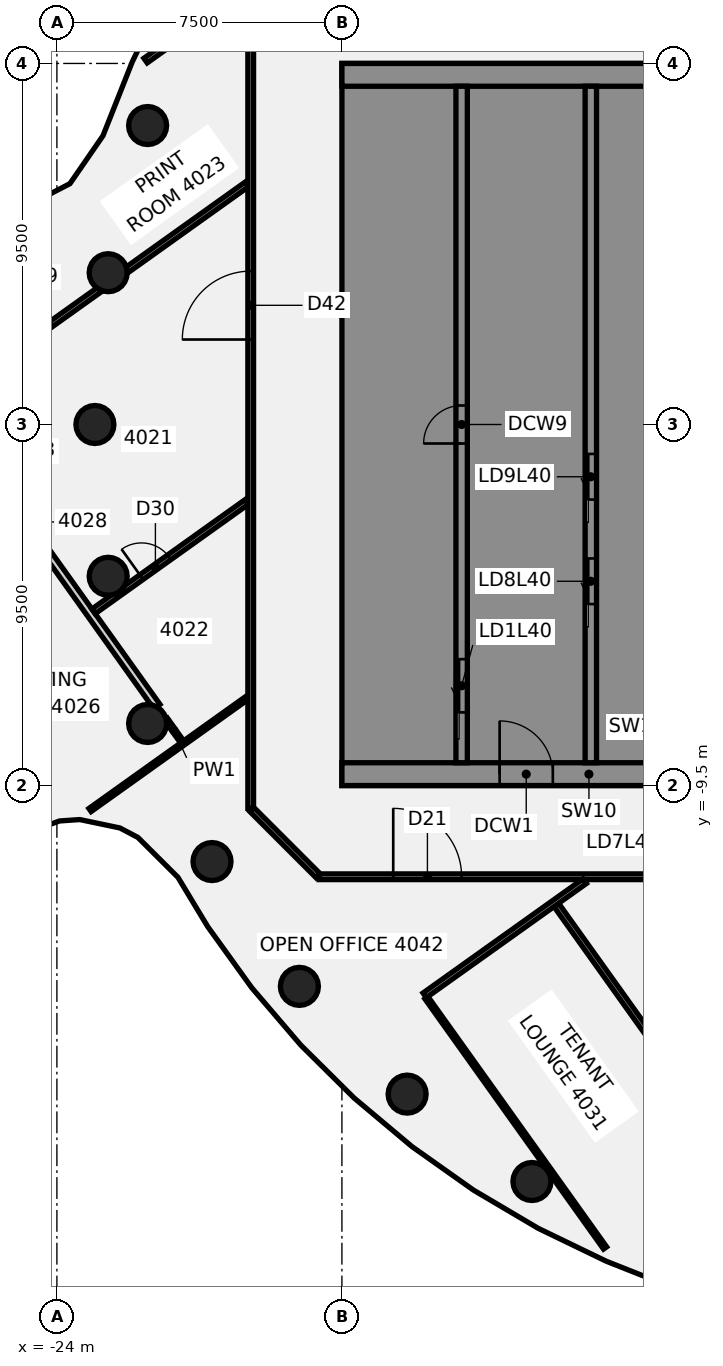
"""IFC4 building model, lengths in metres.
Left out: names, types, materials, properties, quantities, classifications, styles, units other than length and angle.
Written with IfcOpenShell. Run it as: python <this file> out.ifc"""

import sys

from ifc_helpers import new_model, si_unit, direction, frame, frame_2d, origin, origin_2d, place, context, subcontext, project, spatial, polyline, rectangle, circle, outline, extrude, element, fill, save


model = new_model("IFC4")
c1 = context("Model", 3, precision=1e-05, world=origin(), true_north=direction((0.0, 1.0)))
c2 = subcontext(c1, "Body", "Model", "MODEL_VIEW")
j1 = project(units=[si_unit("LENGTHUNIT", "METRE"), si_unit("PLANEANGLEUNIT", "RADIAN")], contexts=[c1])
p1 = place(None, origin())
s1 = spatial("IfcSite", under=j1, at=p1, CompositionType="ELEMENT")
p2 = place(p1, origin())
s2 = spatial("IfcBuilding", under=s1, at=p2, CompositionType="ELEMENT")
p3 = place(p2, frame((0.0, 0.0, 163.0)))
s3 = spatial("IfcBuildingStorey", under=s2, at=p3, CompositionType="ELEMENT", Elevation=163.0)
for number, where, z_axis, x_axis in (
    (1, (-21.613, 7.866, -0.14), (0.0, 0.0, 1.0), (1.0, 0.0, 0.0)),
    (2, (-22.651, 3.994, -0.14), (0.0, 0.0, 1.0), (1.0, 0.0, 0.0)),
    (3, (-23.0, 0.0, -0.14), (0.0, 0.0, 1.0), (1.0, 0.0, 0.0)),
    (4, (-22.651, -3.994, -0.14), (0.0, 0.0, 1.0), (1.0, 0.0, 0.0)),
    (5, (-21.613, -7.866, -0.14), (0.0, 0.0, 1.0), (1.0, 0.0, 0.0)),
    (6, (-19.919, -11.5, -0.14), (0.0, 0.0, 1.0), (1.0, 0.0, 0.0)),
    (7, (-17.619, -14.784, -0.14), (0.0, 0.0, 1.0), (1.0, 0.0, 0.0)),
    (8, (-14.784, -17.619, -0.14), (0.0, 0.0, 1.0), (1.0, 0.0, 0.0)),
    (9, (-11.5, -19.919, -0.14), (0.0, 0.0, 1.0), (1.0, 0.0, 0.0)),
):
    element("IfcColumn", number, at=place(p3, frame(where, z_axis=z_axis, x_axis=x_axis)), inside=s3, PredefinedType="COLUMN", context=c2, shape_type="SweptSolid", body=[
        extrude(circle(Radius=0.5, at=origin_2d()), origin(), (0.0, 0.0, 1.0), 3.75),
    ])
p4 = place(p3, frame((-28.985, 3.244, 0.0), z_axis=(0.0, 0.0, 1.0), x_axis=(0.581102498489, -0.813830379287, 0.0)))
e10 = element("IfcWall", 10, at=p4, inside=s3, PredefinedType="PARTITIONING", context=c2, shape_type="SweptSolid", body=[
    extrude(rectangle(XDim=13.106, YDim=0.2, at=frame_2d((6.553, 0.0))), origin(), (0.0, 0.0, 1.0), 3.01),
])
p5 = place(p4, frame((5.799, 0.0, 0.0)))
e11 = element("IfcOpeningElement", 11, at=p5, cuts=e10, PredefinedType="OPENING", context=c2, shape_type="SweptSolid", body=[
    extrude(rectangle(XDim=1.4, YDim=2.1, at=frame_2d((0.7, 1.05))), frame((0.0, 0.11, 0.0), z_axis=(0.0, -1.0, 0.0), x_axis=(1.0, 0.0, 0.0)), (0.0, 0.0, 1.0), 0.22),
])
p6 = place(p3, frame((-21.134, -7.752, 0.0), z_axis=(0.0, 0.0, 1.0), x_axis=(0.581112755837, -0.813823055094, 0.0)))
e12 = element("IfcWall", 12, at=p6, inside=s3, PredefinedType="PARTITIONING", context=c2, shape_type="SweptSolid", body=[
    extrude(rectangle(XDim=0.737, YDim=0.1, at=frame_2d((0.368, 0.0))), origin(), (0.0, 0.0, 1.0), 3.01),
])
p7 = place(p3, frame((-14.276, -15.083, 0.0), z_axis=(0.0, 0.0, 1.0), x_axis=(0.581066903394, -0.813855794217, 0.0)))
e13 = element("IfcWall", 13, at=p7, inside=s3, PredefinedType="PARTITIONING", context=c2, shape_type="SweptSolid", body=[
    extrude(rectangle(XDim=8.09, YDim=0.1, at=frame_2d((4.045, 0.0))), origin(), (0.0, 0.0, 1.0), 3.01),
])
p8 = place(p3, frame((-10.855, -12.646, 0.0), z_axis=(0.0, 0.0, 1.0), x_axis=(0.581046528205, -0.813870341063, 0.0)))
e14 = element("IfcWall", 14, at=p8, inside=s3, PredefinedType="PARTITIONING", context=c2, shape_type="SweptSolid", body=[
    extrude(rectangle(XDim=11.689, YDim=0.15, at=frame_2d((5.844, 0.0))), origin(), (0.0, 0.0, 1.0), 3.01),
])
p9 = place(p8, frame((6.37, 0.0, 0.0)))
e15 = element("IfcOpeningElement", 15, at=p9, cuts=e14, PredefinedType="OPENING", context=c2, shape_type="SweptSolid", body=[
    extrude(rectangle(XDim=1.8, YDim=2.1, at=frame_2d((0.9, 1.05))), frame((0.0, 0.085, 0.0), z_axis=(0.0, -1.0, 0.0), x_axis=(1.0, 0.0, 0.0)), (0.0, 0.0, 1.0), 0.17),
])
p10 = place(p3, frame((-18.872, -10.128, 0.0), z_axis=(0.0, 0.0, 1.0), x_axis=(0.707106781187, -0.707106781187, 0.0)))
e16 = element("IfcWall", 16, at=p10, inside=s3, PredefinedType="PARTITIONING", context=c2, shape_type="SweptSolid", body=[
    extrude(rectangle(XDim=2.465, YDim=0.15, at=frame_2d((1.232, 0.0))), origin(), (0.0, 0.0, 1.0), 3.01),
])
p11 = place(p3, frame((-17.1, -11.9, 0.0), z_axis=(0.0, 0.0, 1.0), x_axis=(1.0, 0.0, 0.0)))
e17 = element("IfcWall", 17, at=p11, inside=s3, PredefinedType="PARTITIONING", context=c2, shape_type="SweptSolid", body=[
    extrude(rectangle(XDim=34.165, YDim=0.15, at=frame_2d((17.083, 0.0))), origin(), (0.0, 0.0, 1.0), 3.01),
])
p12 = place(p11, frame((9.703, 0.0, 0.0)))
e18 = element("IfcOpeningElement", 18, at=p12, cuts=e17, PredefinedType="OPENING", context=c2, shape_type="SweptSolid", body=[
    extrude(rectangle(XDim=1.8, YDim=2.1, at=frame_2d((0.9, 1.05))), frame((0.0, 0.085, 0.0), z_axis=(0.0, -1.0, 0.0), x_axis=(1.0, 0.0, 0.0)), (0.0, 0.0, 1.0), 0.17),
])
p13 = place(p11, frame((1.95, 0.0, 0.0)))
e19 = element("IfcOpeningElement", 19, at=p13, cuts=e17, PredefinedType="OPENING", context=c2, shape_type="SweptSolid", body=[
    extrude(rectangle(XDim=1.8, YDim=2.1, at=frame_2d((0.9, 1.05))), frame((0.0, 0.085, 0.0), z_axis=(0.0, -1.0, 0.0), x_axis=(1.0, 0.0, 0.0)), (0.0, 0.0, 1.0), 0.17),
])
p14 = place(p11, frame((23.878, 0.0, 0.0)))
e20 = element("IfcOpeningElement", 20, at=p14, cuts=e17, PredefinedType="OPENING", context=c2, shape_type="SweptSolid", body=[
    extrude(rectangle(XDim=1.8, YDim=2.1, at=frame_2d((0.9, 1.05))), frame((0.0, 0.085, 0.0), z_axis=(0.0, -1.0, 0.0), x_axis=(1.0, 0.0, 0.0)), (0.0, 0.0, 1.0), 0.17),
])
p15 = place(p3, frame((-14.322, -15.02, 0.0), z_axis=(0.0, 0.0, 1.0), x_axis=(0.81419877711, 0.580586213541, 0.0)))
e21 = element("IfcWall", 21, at=p15, inside=s3, PredefinedType="PARTITIONING", context=c2, shape_type="SweptSolid", body=[
    extrude(rectangle(XDim=5.173, YDim=0.15, at=frame_2d((2.586, 0.0))), origin(), (0.0, 0.0, 1.0), 3.01),
])
p16 = place(p3, frame((-26.987, 0.617, 0.0), z_axis=(0.0, 0.0, 1.0), x_axis=(0.81386107039, 0.581059513392, 0.0)))
e22 = element("IfcWall", 22, at=p16, inside=s3, PredefinedType="PARTITIONING", context=c2, shape_type="SweptSolid", body=[
    extrude(rectangle(XDim=5.041, YDim=0.15, at=frame_2d((2.521, 0.0))), origin(), (0.0, 0.0, 1.0), 3.01),
])
p17 = place(p16, frame((2.6, 0.0, 0.0)))
e23 = element("IfcOpeningElement", 23, at=p17, cuts=e22, PredefinedType="OPENING", context=c2, shape_type="SweptSolid", body=[
    extrude(rectangle(XDim=0.9, YDim=2.1, at=frame_2d((0.45, 1.05))), frame((0.0, 0.085, 0.0), z_axis=(0.0, -1.0, 0.0), x_axis=(1.0, 0.0, 0.0)), (0.0, 0.0, 1.0), 0.17),
])
p18 = place(p3, frame((-22.159, 4.064, 0.0), z_axis=(0.0, 0.0, 1.0), x_axis=(0.813818497272, 0.581119138816, 0.0)))
e24 = element("IfcWall", 24, at=p18, inside=s3, PredefinedType="PARTITIONING", context=c2, shape_type="SweptSolid", body=[
    extrude(rectangle(XDim=3.88, YDim=0.15, at=frame_2d((1.94, 0.0))), origin(), (0.0, 0.0, 1.0), 3.01),
])
p19 = place(p3, frame((-23.036, -4.917, 0.0), z_axis=(0.0, 0.0, 1.0), x_axis=(0.813829971932, 0.581103068986, 0.0)))
e25 = element("IfcWall", 25, at=p19, inside=s3, PredefinedType="PARTITIONING", context=c2, shape_type="SweptSolid", body=[
    extrude(rectangle(XDim=4.957, YDim=0.15, at=frame_2d((2.479, 0.0))), origin(), (0.0, 0.0, 1.0), 3.01),
])
p20 = place(p19, frame((1.55, 0.0, 0.0)))
e26 = element("IfcOpeningElement", 26, at=p20, cuts=e25, PredefinedType="OPENING", context=c2, shape_type="SweptSolid", body=[
    extrude(rectangle(XDim=0.9, YDim=2.1, at=frame_2d((0.45, 1.05))), frame((0.0, 0.085, 0.0), z_axis=(0.0, -1.0, 0.0), x_axis=(1.0, 0.0, 0.0)), (0.0, 0.0, 1.0), 0.17),
])
p21 = place(p3, frame((-23.129, -10.144, 0.0), z_axis=(0.0, 0.0, 1.0), x_axis=(0.813856589763, 0.581065789132, 0.0)))
e27 = element("IfcWall", 27, at=p21, inside=s3, PredefinedType="PARTITIONING", context=c2, shape_type="SweptSolid", body=[
    extrude(rectangle(XDim=5.091, YDim=0.1, at=frame_2d((2.545, 0.0))), origin(), (0.0, 0.0, 1.0), 3.01),
])
p22 = place(p3, frame((-21.667, 9.575, 0.0), z_axis=(0.0, 0.0, 1.0), x_axis=(0.813848610714, 0.581076964643, 0.0)))
e28 = element("IfcWall", 28, at=p22, inside=s3, PredefinedType="PARTITIONING", context=c2, shape_type="SweptSolid", body=[
    extrude(rectangle(XDim=8.165, YDim=0.15, at=frame_2d((4.083, 0.0))), origin(), (0.0, 0.0, 1.0), 3.01),
])
p23 = place(p3, frame((-18.9, -10.1, 0.0), z_axis=(0.0, 0.0, 1.0), x_axis=(0.0, 1.0, 0.0)))
e29 = element("IfcWall", 29, at=p23, inside=s3, PredefinedType="PARTITIONING", context=c2, shape_type="SweptSolid", body=[
    extrude(rectangle(XDim=20.2, YDim=0.15, at=frame_2d((10.1, 0.0))), origin(), (0.0, 0.0, 1.0), 3.01),
])
p24 = place(p23, frame((12.336, 0.0, 0.0)))
e30 = element("IfcOpeningElement", 30, at=p24, cuts=e29, PredefinedType="OPENING", context=c2, shape_type="SweptSolid", body=[
    extrude(rectangle(XDim=1.8, YDim=2.1, at=frame_2d((0.9, 1.05))), frame((0.0, 0.085, 0.0), z_axis=(0.0, -1.0, 0.0), x_axis=(1.0, 0.0, 0.0)), (0.0, 0.0, 1.0), 0.17),
])
p25 = place(p3, frame((-16.5, -9.2, 0.0), z_axis=(0.0, 0.0, 1.0), x_axis=(1.0, 0.0, 0.0)))
e31 = element("IfcWall", 31, at=p25, inside=s3, PredefinedType="SHEAR", context=c2, shape_type="SweptSolid", body=[
    extrude(rectangle(XDim=13.0, YDim=0.6, at=frame_2d((6.5, 0.0))), origin(), (0.0, 0.0, 1.0), 3.61),
])
p26 = place(p25, frame((4.15, 0.0, 0.0)))
e32 = element("IfcOpeningElement", 32, at=p26, cuts=e31, PredefinedType="OPENING", context=c2, shape_type="SweptSolid", body=[
    extrude(rectangle(XDim=1.4, YDim=2.1, at=frame_2d((0.7, 1.05))), frame((0.0, 0.31, 0.0), z_axis=(0.0, -1.0, 0.0), x_axis=(1.0, 0.0, 0.0)), (0.0, 0.0, 1.0), 0.62),
])
p27 = place(p25, frame((10.125, 0.0, 0.0)))
e33 = element("IfcOpeningElement", 33, at=p27, cuts=e31, PredefinedType="OPENING", context=c2, shape_type="SweptSolid", body=[
    extrude(rectangle(XDim=1.4, YDim=2.1, at=frame_2d((0.7, 1.05))), frame((0.0, 0.31, 0.0), z_axis=(0.0, -1.0, 0.0), x_axis=(1.0, 0.0, 0.0)), (0.0, 0.0, 1.0), 0.62),
])
p28 = place(p3, origin())
e34 = element("IfcWall", 34, at=p28, inside=s3, PredefinedType="SHEAR", context=c2, shape_type="SweptSolid", body=[
    extrude(outline(polyline([(-13.5, -8.125), (-15.9, -8.125), (-15.9, -5.625), (-13.5, -5.625), (-13.5, -5.375), (-15.9, -5.375), (-15.9, 5.375), (-13.5, 5.375), (-13.5, 5.625), (-15.9, 5.625), (-15.9, 8.125), (-13.5, 8.125), (-13.5, 8.9), (-15.9, 8.9), (-16.5, 8.9), (-16.5, -8.9), (-15.9, -8.9), (-13.5, -8.9), (-13.5, -8.125)])), origin(), (0.0, 0.0, 1.0), 3.61),
])
p29 = place(p3, frame((-16.5, 9.2, 0.0), z_axis=(0.0, 0.0, 1.0), x_axis=(1.0, 0.0, 0.0)))
e35 = element("IfcWall", 35, at=p29, inside=s3, PredefinedType="SHEAR", context=c2, shape_type="SweptSolid", body=[
    extrude(rectangle(XDim=13.0, YDim=0.6, at=frame_2d((6.5, 0.0))), origin(), (0.0, 0.0, 1.0), 3.61),
])
p30 = place(p3, origin())
e36 = element("IfcWall", 36, at=p30, inside=s3, PredefinedType="SHEAR", context=c2, shape_type="SweptSolid", body=[
    extrude(outline(polyline([(-9.8, -5.375), (-9.8, -5.625), (-7.5, -5.625), (-7.2, -5.625), (-7.2, 8.9), (-7.5, 8.9), (-9.8, 8.9), (-9.8, 8.125), (-7.5, 8.125), (-7.5, 5.625), (-9.8, 5.625), (-9.8, 5.375), (-7.5, 5.375), (-7.5, 2.875), (-9.8, 2.875), (-9.8, 2.625), (-7.5, 2.625), (-7.5, 0.125), (-9.8, 0.125), (-9.8, -0.125), (-7.5, -0.125), (-7.5, -2.625), (-9.8, -2.625), (-9.8, -2.875), (-7.5, -2.875), (-7.5, -5.375), (-9.8, -5.375)])), origin(), (0.0, 0.0, 1.0), 3.61),
])
p31 = place(p3, origin())
e37 = element("IfcWall", 37, at=p31, inside=s3, PredefinedType="SHEAR", context=c2, shape_type="SweptSolid", body=[
    extrude(outline(polyline([(-7.5, -8.125), (-9.55, -8.125), (-9.55, -5.625), (-9.8, -5.625), (-9.8, -8.125), (-9.8, -8.9), (-7.5, -8.9), (-7.5, -8.125)])), origin(), (0.0, 0.0, 1.0), 3.61),
])
p32 = place(p3, frame((-13.35, -8.9, 0.0), z_axis=(0.0, 0.0, 1.0), x_axis=(0.0, 1.0, 0.0)))
e38 = element("IfcWall", 38, at=p32, inside=s3, PredefinedType="SHEAR", context=c2, shape_type="SweptSolid", body=[
    extrude(rectangle(XDim=17.8, YDim=0.3, at=frame_2d((8.9, 0.0))), origin(), (0.0, 0.0, 1.0), 3.61),
])
p33 = place(p32, frame((1.325, 0.0, 0.0)))
e39 = element("IfcOpeningElement", 39, at=p33, cuts=e38, PredefinedType="OPENING", context=c2, shape_type="SweptSolid", body=[
    extrude(rectangle(XDim=1.4, YDim=2.1, at=frame_2d((0.7, 1.05))), frame((0.0, 0.16, 0.0), z_axis=(0.0, -1.0, 0.0), x_axis=(1.0, 0.0, 0.0)), (0.0, 0.0, 1.0), 0.32),
])
p34 = place(p32, frame((8.4, 0.0, 0.0)))
e40 = element("IfcOpeningElement", 40, at=p34, cuts=e38, PredefinedType="OPENING", context=c2, shape_type="SweptSolid", body=[
    extrude(rectangle(XDim=1.0, YDim=2.1, at=frame_2d((0.5, 1.05))), frame((0.0, 0.16, 0.0), z_axis=(0.0, -1.0, 0.0), x_axis=(1.0, 0.0, 0.0)), (0.0, 0.0, 1.0), 0.32),
])
p35 = place(p3, frame((-9.95, -8.9, 0.0), z_axis=(0.0, 0.0, 1.0), x_axis=(0.0, 1.0, 0.0)))
e41 = element("IfcWall", 41, at=p35, inside=s3, PredefinedType="SHEAR", context=c2, shape_type="SweptSolid", body=[
    extrude(rectangle(XDim=17.8, YDim=0.3, at=frame_2d((8.9, 0.0))), origin(), (0.0, 0.0, 1.0), 3.61),
])
p36 = place(p35, frame((4.175, 0.0, 0.0)))
e42 = element("IfcOpeningElement", 42, at=p36, cuts=e41, PredefinedType="OPENING", context=c2, shape_type="SweptSolid", body=[
    extrude(rectangle(XDim=1.2, YDim=2.1, at=frame_2d((0.6, 1.05))), frame((0.0, 0.16, 0.0), z_axis=(0.0, -1.0, 0.0), x_axis=(1.0, 0.0, 0.0)), (0.0, 0.0, 1.0), 0.32),
])
p37 = place(p35, frame((6.925, 0.0, 0.0)))
e43 = element("IfcOpeningElement", 43, at=p37, cuts=e41, PredefinedType="OPENING", context=c2, shape_type="SweptSolid", body=[
    extrude(rectangle(XDim=1.2, YDim=2.1, at=frame_2d((0.6, 1.05))), frame((0.0, 0.16, 0.0), z_axis=(0.0, -1.0, 0.0), x_axis=(1.0, 0.0, 0.0)), (0.0, 0.0, 1.0), 0.32),
])
p38 = place(p13, frame((1.8, 0.0, 0.0), z_axis=(0.0, 0.0, 1.0), x_axis=(-1.0, 0.0, 0.0)))
e44 = element("IfcDoor", 44, at=p38, inside=s3, OperationType="DOUBLE_DOOR_SINGLE_SWING", PredefinedType="DOOR", context=c2, shape_type="SweptSolid", body=[
    extrude(rectangle(XDim=1.8, YDim=2.1, at=frame_2d((0.9, 1.05))), frame((0.0, 0.025, 0.0), z_axis=(0.0, -1.0, 0.0), x_axis=(1.0, 0.0, 0.0)), (0.0, 0.0, 1.0), 0.05),
])
fill(e19, e44)
p39 = place(p17, origin())
e45 = element("IfcDoor", 45, at=p39, inside=s3, OperationType="SINGLE_SWING_LEFT", PredefinedType="DOOR", context=c2, shape_type="SweptSolid", body=[
    extrude(rectangle(XDim=0.9, YDim=2.1, at=frame_2d((0.45, 1.05))), frame((0.0, 0.025, 0.0), z_axis=(0.0, -1.0, 0.0), x_axis=(1.0, 0.0, 0.0)), (0.0, 0.0, 1.0), 0.05),
])
fill(e23, e45)
p40 = place(p20, frame((0.9, 0.0, 0.0), z_axis=(0.0, 0.0, 1.0), x_axis=(-1.0, 0.0, 0.0)))
e46 = element("IfcDoor", 46, at=p40, inside=s3, OperationType="SINGLE_SWING_LEFT", PredefinedType="DOOR", context=c2, shape_type="SweptSolid", body=[
    extrude(rectangle(XDim=0.9, YDim=2.1, at=frame_2d((0.45, 1.05))), frame((0.0, 0.025, 0.0), z_axis=(0.0, -1.0, 0.0), x_axis=(1.0, 0.0, 0.0)), (0.0, 0.0, 1.0), 0.05),
])
fill(e26, e46)
p41 = place(p24, frame((1.8, 0.0, 0.0), z_axis=(0.0, 0.0, 1.0), x_axis=(-1.0, 0.0, 0.0)))
e47 = element("IfcDoor", 47, at=p41, inside=s3, OperationType="DOUBLE_DOOR_SINGLE_SWING", PredefinedType="DOOR", context=c2, shape_type="SweptSolid", body=[
    extrude(rectangle(XDim=1.8, YDim=2.1, at=frame_2d((0.9, 1.05))), frame((0.0, 0.025, 0.0), z_axis=(0.0, -1.0, 0.0), x_axis=(1.0, 0.0, 0.0)), (0.0, 0.0, 1.0), 0.05),
])
fill(e30, e47)
p42 = place(p26, origin())
e48 = element("IfcDoor", 48, at=p42, inside=s3, OperationType="SINGLE_SWING_LEFT", PredefinedType="DOOR", context=c2, shape_type="SweptSolid", body=[
    extrude(rectangle(XDim=1.4, YDim=2.1, at=frame_2d((0.7, 1.05))), frame((0.0, 0.025, 0.0), z_axis=(0.0, -1.0, 0.0), x_axis=(1.0, 0.0, 0.0)), (0.0, 0.0, 1.0), 0.05),
])
fill(e32, e48)
p43 = place(p33, origin())
e49 = element("IfcDoor", 49, at=p43, inside=s3, OperationType="SLIDING_TO_LEFT", PredefinedType="DOOR", context=c2, shape_type="SweptSolid", body=[
    extrude(rectangle(XDim=1.4, YDim=2.1, at=frame_2d((0.7, 1.05))), frame((0.0, 0.025, 0.0), z_axis=(0.0, -1.0, 0.0), x_axis=(1.0, 0.0, 0.0)), (0.0, 0.0, 1.0), 0.05),
])
fill(e39, e49)
p44 = place(p36, origin())
e50 = element("IfcDoor", 50, at=p44, inside=s3, OperationType="SLIDING_TO_LEFT", PredefinedType="DOOR", context=c2, shape_type="SweptSolid", body=[
    extrude(rectangle(XDim=1.2, YDim=2.1, at=frame_2d((0.6, 1.05))), frame((0.0, 0.025, 0.0), z_axis=(0.0, -1.0, 0.0), x_axis=(1.0, 0.0, 0.0)), (0.0, 0.0, 1.0), 0.05),
])
fill(e42, e50)
p45 = place(p37, origin())
e51 = element("IfcDoor", 51, at=p45, inside=s3, OperationType="SLIDING_TO_LEFT", PredefinedType="DOOR", context=c2, shape_type="SweptSolid", body=[
    extrude(rectangle(XDim=1.2, YDim=2.1, at=frame_2d((0.6, 1.05))), frame((0.0, 0.025, 0.0), z_axis=(0.0, -1.0, 0.0), x_axis=(1.0, 0.0, 0.0)), (0.0, 0.0, 1.0), 0.05),
])
fill(e43, e51)
p46 = place(p34, origin())
e52 = element("IfcDoor", 52, at=p46, inside=s3, OperationType="SINGLE_SWING_LEFT", PredefinedType="DOOR", context=c2, shape_type="SweptSolid", body=[
    extrude(rectangle(XDim=1.0, YDim=2.1, at=frame_2d((0.5, 1.05))), frame((0.0, 0.025, 0.0), z_axis=(0.0, -1.0, 0.0), x_axis=(1.0, 0.0, 0.0)), (0.0, 0.0, 1.0), 0.05),
])
fill(e40, e52)
save(model, sys.argv[1])
